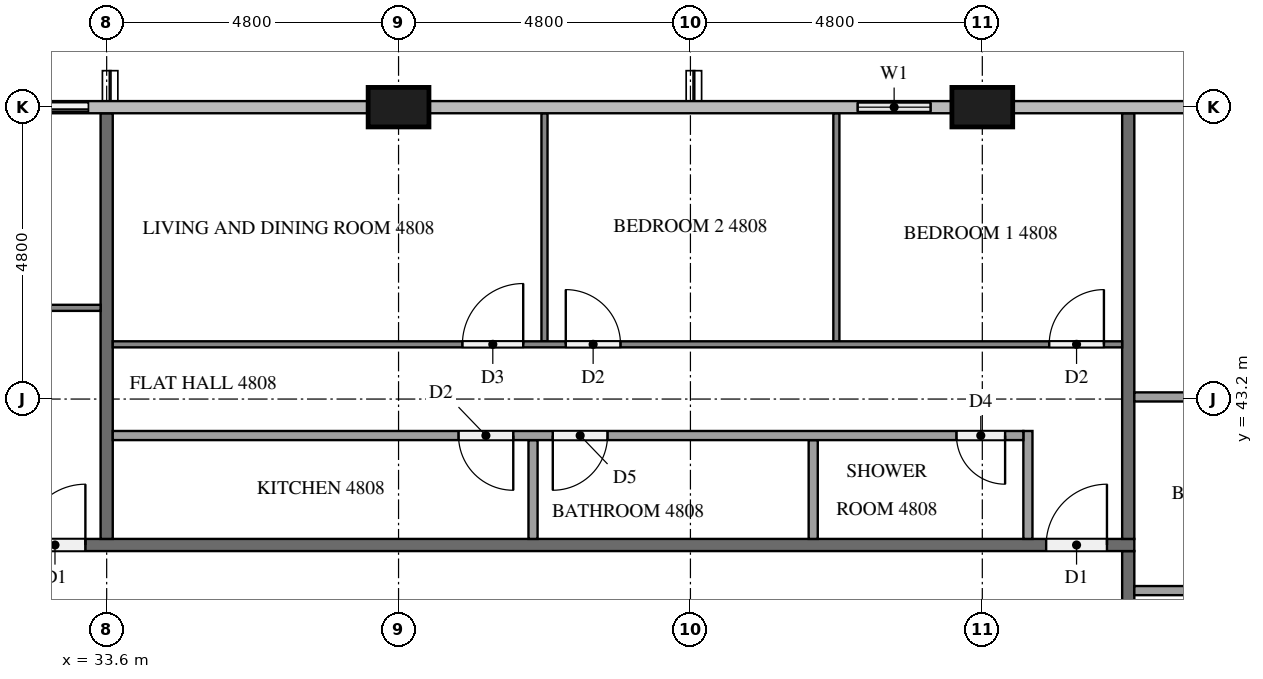
"""IFC4 building model, lengths in metres.
Left out: names, types, materials, properties, quantities, classifications, styles, units other than length and angle.
Written with IfcOpenShell. Run it as: python <this file> out.ifc"""

import sys

from ifc_helpers import new_model, si_unit, direction, frame, frame_2d, origin, origin_2d, place, context, subcontext, project, spatial, rectangle, extrude, element, fill, save


model = new_model("IFC4")
c1 = context("Model", 3, precision=1e-05, world=origin(), true_north=direction((0.0, 1.0)))
c2 = subcontext(c1, "Body", "Model", "MODEL_VIEW")
j1 = project(units=[si_unit("LENGTHUNIT", "METRE"), si_unit("PLANEANGLEUNIT", "RADIAN")], contexts=[c1])
p1 = place(None, origin())
s1 = spatial("IfcSite", under=j1, at=p1, CompositionType="ELEMENT")
p2 = place(p1, origin())
s2 = spatial("IfcBuilding", under=s1, at=p2, CompositionType="ELEMENT")
p3 = place(p2, frame((0.0, 0.0, 185.9)))
s3 = spatial("IfcBuildingStorey", under=s2, at=p3, CompositionType="ELEMENT", Elevation=185.9)
for number, where, z_axis, x_axis in (
    (1, (48.0, 48.0, 0.0), (0.0, 0.0, 1.0), (1.0, 0.0, 0.0)),
    (2, (38.4, 48.0, 0.0), (0.0, 0.0, 1.0), (1.0, 0.0, 0.0)),
):
    element("IfcColumn", number, at=place(p3, frame(where, z_axis=z_axis, x_axis=x_axis)), inside=s3, PredefinedType="COLUMN", context=c2, shape_type="SweptSolid", body=[
        extrude(rectangle(XDim=1.0, YDim=0.65, at=origin_2d()), origin(), (0.0, 0.0, 1.0), 3.2),
    ])
p4 = place(p3, frame((47.5, 48.0, 0.0), z_axis=(0.0, 0.0, 1.0), x_axis=(-1.0, 0.0, 0.0)))
e3 = element("IfcWall", 3, at=p4, inside=s3, PredefinedType="SOLIDWALL", context=c2, shape_type="SweptSolid", body=[
    extrude(rectangle(XDim=1.9, YDim=0.15, at=frame_2d((0.95, 0.0))), origin(), (0.0, 0.0, 1.0), 3.2),
])
p5 = place(p4, frame((0.35, 0.0, 0.9)))
e4 = element("IfcOpeningElement", 4, at=p5, cuts=e3, PredefinedType="OPENING", context=c2, shape_type="SweptSolid", body=[
    extrude(rectangle(XDim=1.2, YDim=1.4, at=frame_2d((0.6, 0.7))), frame((0.0, 0.085, 0.0), z_axis=(0.0, -1.0, 0.0), x_axis=(1.0, 0.0, 0.0)), (0.0, 0.0, 1.0), 0.17),
])
p6 = place(p3, frame((33.6, 48.0, 0.0), z_axis=(0.0, 0.0, 1.0), x_axis=(-1.0, 0.0, 0.0)))
e5 = element("IfcWall", 5, at=p6, inside=s3, PredefinedType="SOLIDWALL", context=c2, shape_type="SweptSolid", body=[
    extrude(rectangle(XDim=2.4, YDim=0.15, at=frame_2d((1.2, 0.0))), origin(), (0.0, 0.0, 1.0), 3.2),
])
p7 = place(p6, frame((0.3, 0.0, 0.0)))
e6 = element("IfcOpeningElement", 6, at=p7, cuts=e5, PredefinedType="OPENING", context=c2, shape_type="SweptSolid", body=[
    extrude(rectangle(XDim=1.8, YDim=2.4, at=frame_2d((0.9, 1.2))), frame((0.0, 0.085, 0.0), z_axis=(0.0, -1.0, 0.0), x_axis=(1.0, 0.0, 0.0)), (0.0, 0.0, 1.0), 0.17),
])
p8 = place(p3, frame((50.4, 40.7, 0.0), z_axis=(0.0, 0.0, 1.0), x_axis=(0.0, -1.0, 0.0)))
e7 = element("IfcWall", 7, at=p8, inside=s3, PredefinedType="PARTITIONING", context=c2, shape_type="SweptSolid", body=[
    extrude(rectangle(XDim=28.6, YDim=0.2, at=frame_2d((14.3, 0.0))), origin(), (0.0, 0.0, 1.0), 3.2),
])
p9 = place(p8, frame((27.3, 0.0, 0.0)))
e8 = element("IfcOpeningElement", 8, at=p9, cuts=e7, PredefinedType="OPENING", context=c2, shape_type="SweptSolid", body=[
    extrude(rectangle(XDim=1.1, YDim=2.1, at=frame_2d((0.55, 1.05))), frame((0.0, 0.11, 0.0), z_axis=(0.0, -1.0, 0.0), x_axis=(1.0, 0.0, 0.0)), (0.0, 0.0, 1.0), 0.22),
])
p10 = place(p8, frame((8.15, 0.0, 0.0)))
e9 = element("IfcOpeningElement", 9, at=p10, cuts=e7, PredefinedType="OPENING", context=c2, shape_type="SweptSolid", body=[
    extrude(rectangle(XDim=1.0, YDim=2.1, at=frame_2d((0.5, 1.05))), frame((0.0, 0.11, 0.0), z_axis=(0.0, -1.0, 0.0), x_axis=(1.0, 0.0, 0.0)), (0.0, 0.0, 1.0), 0.22),
])
p11 = place(p8, frame((0.95, 0.0, 0.0)))
e10 = element("IfcOpeningElement", 10, at=p11, cuts=e7, PredefinedType="OPENING", context=c2, shape_type="SweptSolid", body=[
    extrude(rectangle(XDim=1.0, YDim=2.1, at=frame_2d((0.5, 1.05))), frame((0.0, 0.11, 0.0), z_axis=(0.0, -1.0, 0.0), x_axis=(1.0, 0.0, 0.0)), (0.0, 0.0, 1.0), 0.22),
])
p12 = place(p3, frame((11.9, 40.8, 0.0), z_axis=(0.0, 0.0, 1.0), x_axis=(1.0, 0.0, 0.0)))
e11 = element("IfcWall", 11, at=p12, inside=s3, PredefinedType="PARTITIONING", context=c2, shape_type="SweptSolid", body=[
    extrude(rectangle(XDim=38.6, YDim=0.2, at=frame_2d((19.3, 0.0))), origin(), (0.0, 0.0, 1.0), 3.2),
])
p13 = place(p12, frame((37.15, 0.0, 0.0)))
e12 = element("IfcOpeningElement", 12, at=p13, cuts=e11, PredefinedType="OPENING", context=c2, shape_type="SweptSolid", body=[
    extrude(rectangle(XDim=1.0, YDim=2.1, at=frame_2d((0.5, 1.05))), frame((0.0, 0.11, 0.0), z_axis=(0.0, -1.0, 0.0), x_axis=(1.0, 0.0, 0.0)), (0.0, 0.0, 1.0), 0.22),
])
p14 = place(p12, frame((20.35, 0.0, 0.0)))
e13 = element("IfcOpeningElement", 13, at=p14, cuts=e11, PredefinedType="OPENING", context=c2, shape_type="SweptSolid", body=[
    extrude(rectangle(XDim=1.0, YDim=2.1, at=frame_2d((0.5, 1.05))), frame((0.0, 0.11, 0.0), z_axis=(0.0, -1.0, 0.0), x_axis=(1.0, 0.0, 0.0)), (0.0, 0.0, 1.0), 0.22),
])
p15 = place(p12, frame((13.15, 0.0, 0.0)))
e14 = element("IfcOpeningElement", 14, at=p15, cuts=e11, PredefinedType="OPENING", context=c2, shape_type="SweptSolid", body=[
    extrude(rectangle(XDim=1.0, YDim=2.1, at=frame_2d((0.5, 1.05))), frame((0.0, 0.11, 0.0), z_axis=(0.0, -1.0, 0.0), x_axis=(1.0, 0.0, 0.0)), (0.0, 0.0, 1.0), 0.22),
])
for number, where, z_axis, x_axis in (
    (15, (50.4, 40.9, 0.0), (0.0, 0.0, 1.0), (0.0, 1.0, 0.0)),
    (16, (33.6, 47.9, 0.0), (0.0, 0.0, 1.0), (0.0, -1.0, 0.0)),
):
    element("IfcWall", number, at=place(p3, frame(where, z_axis=z_axis, x_axis=x_axis)), inside=s3, PredefinedType="PARTITIONING", context=c2, shape_type="SweptSolid", body=[
        extrude(rectangle(XDim=7.0, YDim=0.2, at=frame_2d((3.5, 0.0))), origin(), (0.0, 0.0, 1.0), 3.2),
    ])
p16 = place(p3, frame((50.5, 43.235, 0.0), z_axis=(0.0, 0.0, 1.0), x_axis=(1.0, 0.0, 0.0)))
e17 = element("IfcWall", 17, at=p16, inside=s3, PredefinedType="PARTITIONING", context=c2, shape_type="SweptSolid", body=[
    extrude(rectangle(XDim=3.725, YDim=0.15, at=frame_2d((1.863, 0.0))), origin(), (0.0, 0.0, 1.0), 3.2),
])
p17 = place(p3, frame((50.5, 40.05, 0.0), z_axis=(0.0, 0.0, 1.0), x_axis=(1.0, 0.0, 0.0)))
e18 = element("IfcWall", 18, at=p17, inside=s3, PredefinedType="PARTITIONING", context=c2, shape_type="SweptSolid", body=[
    extrude(rectangle(XDim=3.875, YDim=0.15, at=frame_2d((1.938, 0.0))), origin(), (0.0, 0.0, 1.0), 3.2),
])
for number, where, z_axis, x_axis in (
    (19, (45.6, 44.15, 0.0), (0.0, 0.0, 1.0), (0.0, 1.0, 0.0)),
    (20, (40.8, 44.15, 0.0), (0.0, 0.0, 1.0), (0.0, 1.0, 0.0)),
):
    element("IfcWall", number, at=place(p3, frame(where, z_axis=z_axis, x_axis=x_axis)), inside=s3, PredefinedType="PARTITIONING", context=c2, shape_type="SweptSolid", body=[
        extrude(rectangle(XDim=3.75, YDim=0.1, at=frame_2d((1.875, 0.0))), origin(), (0.0, 0.0, 1.0), 3.2),
    ])
p18 = place(p3, frame((33.7, 44.1, 0.0), z_axis=(0.0, 0.0, 1.0), x_axis=(1.0, 0.0, 0.0)))
e21 = element("IfcWall", 21, at=p18, inside=s3, PredefinedType="PARTITIONING", context=c2, shape_type="SweptSolid", body=[
    extrude(rectangle(XDim=16.6, YDim=0.1, at=frame_2d((8.3, 0.0))), origin(), (0.0, 0.0, 1.0), 3.2),
])
p19 = place(p18, frame((15.4, 0.0, 0.0)))
e22 = element("IfcOpeningElement", 22, at=p19, cuts=e21, PredefinedType="OPENING", context=c2, shape_type="SweptSolid", body=[
    extrude(rectangle(XDim=0.9, YDim=2.1, at=frame_2d((0.45, 1.05))), frame((0.0, 0.06, 0.0), z_axis=(0.0, -1.0, 0.0), x_axis=(1.0, 0.0, 0.0)), (0.0, 0.0, 1.0), 0.12),
])
p20 = place(p18, frame((7.45, 0.0, 0.0)))
e23 = element("IfcOpeningElement", 23, at=p20, cuts=e21, PredefinedType="OPENING", context=c2, shape_type="SweptSolid", body=[
    extrude(rectangle(XDim=0.9, YDim=2.1, at=frame_2d((0.45, 1.05))), frame((0.0, 0.06, 0.0), z_axis=(0.0, -1.0, 0.0), x_axis=(1.0, 0.0, 0.0)), (0.0, 0.0, 1.0), 0.12),
])
p21 = place(p18, frame((5.75, 0.0, 0.0)))
e24 = element("IfcOpeningElement", 24, at=p21, cuts=e21, PredefinedType="OPENING", context=c2, shape_type="SweptSolid", body=[
    extrude(rectangle(XDim=1.0, YDim=2.1, at=frame_2d((0.5, 1.05))), frame((0.0, 0.06, 0.0), z_axis=(0.0, -1.0, 0.0), x_axis=(1.0, 0.0, 0.0)), (0.0, 0.0, 1.0), 0.12),
])
for number, where, z_axis, x_axis in (
    (25, (45.219, 40.9, 0.0), (0.0, 0.0, 1.0), (0.0, 1.0, 0.0)),
    (26, (40.612, 40.9, 0.0), (0.0, 0.0, 1.0), (0.0, 1.0, 0.0)),
):
    element("IfcWall", number, at=place(p3, frame(where, z_axis=z_axis, x_axis=x_axis)), inside=s3, PredefinedType="PARTITIONING", context=c2, shape_type="SweptSolid", body=[
        extrude(rectangle(XDim=1.625, YDim=0.15, at=frame_2d((0.812, 0.0))), origin(), (0.0, 0.0, 1.0), 3.2),
    ])
p22 = place(p3, frame((48.75, 40.9, 0.0), z_axis=(0.0, 0.0, 1.0), x_axis=(0.0, 1.0, 0.0)))
e27 = element("IfcWall", 27, at=p22, inside=s3, PredefinedType="PARTITIONING", context=c2, shape_type="SweptSolid", body=[
    extrude(rectangle(XDim=1.775, YDim=0.15, at=frame_2d((0.888, 0.0))), origin(), (0.0, 0.0, 1.0), 3.2),
])
p23 = place(p3, frame((48.675, 42.6, 0.0), z_axis=(0.0, 0.0, 1.0), x_axis=(-1.0, 0.0, 0.0)))
e28 = element("IfcWall", 28, at=p23, inside=s3, PredefinedType="PARTITIONING", context=c2, shape_type="SweptSolid", body=[
    extrude(rectangle(XDim=14.975, YDim=0.15, at=frame_2d((7.488, 0.0))), origin(), (0.0, 0.0, 1.0), 3.2),
])
p24 = place(p23, frame((0.3, 0.0, 0.0)))
e29 = element("IfcOpeningElement", 29, at=p24, cuts=e28, PredefinedType="OPENING", context=c2, shape_type="SweptSolid", body=[
    extrude(rectangle(XDim=0.8, YDim=2.1, at=frame_2d((0.4, 1.05))), frame((0.0, 0.085, 0.0), z_axis=(0.0, -1.0, 0.0), x_axis=(1.0, 0.0, 0.0)), (0.0, 0.0, 1.0), 0.17),
])
p25 = place(p23, frame((6.838, 0.0, 0.0)))
e30 = element("IfcOpeningElement", 30, at=p25, cuts=e28, PredefinedType="OPENING", context=c2, shape_type="SweptSolid", body=[
    extrude(rectangle(XDim=0.9, YDim=2.1, at=frame_2d((0.45, 1.05))), frame((0.0, 0.085, 0.0), z_axis=(0.0, -1.0, 0.0), x_axis=(1.0, 0.0, 0.0)), (0.0, 0.0, 1.0), 0.17),
])
p26 = place(p23, frame((8.388, 0.0, 0.0)))
e31 = element("IfcOpeningElement", 31, at=p26, cuts=e28, PredefinedType="OPENING", context=c2, shape_type="SweptSolid", body=[
    extrude(rectangle(XDim=0.9, YDim=2.1, at=frame_2d((0.45, 1.05))), frame((0.0, 0.085, 0.0), z_axis=(0.0, -1.0, 0.0), x_axis=(1.0, 0.0, 0.0)), (0.0, 0.0, 1.0), 0.17),
])
p27 = place(p3, frame((26.5, 44.7, 0.0), z_axis=(0.0, 0.0, 1.0), x_axis=(1.0, 0.0, 0.0)))
e32 = element("IfcWall", 32, at=p27, inside=s3, PredefinedType="PARTITIONING", context=c2, shape_type="SweptSolid", body=[
    extrude(rectangle(XDim=7.0, YDim=0.1, at=frame_2d((3.5, 0.0))), origin(), (0.0, 0.0, 1.0), 3.2),
])
p28 = place(p27, frame((0.3, 0.0, 0.0)))
e33 = element("IfcOpeningElement", 33, at=p28, cuts=e32, PredefinedType="OPENING", context=c2, shape_type="SweptSolid", body=[
    extrude(rectangle(XDim=1.0, YDim=2.1, at=frame_2d((0.5, 1.05))), frame((0.0, 0.06, 0.0), z_axis=(0.0, -1.0, 0.0), x_axis=(1.0, 0.0, 0.0)), (0.0, 0.0, 1.0), 0.12),
])
p29 = place(p5, origin())
e34 = element("IfcWindow", 34, at=p29, inside=s3, PartitioningType="SINGLE_PANEL", PredefinedType="WINDOW", context=c2, shape_type="SweptSolid", body=[
    extrude(rectangle(XDim=1.2, YDim=1.4, at=frame_2d((0.6, 0.7))), frame((0.0, 0.03, 0.0), z_axis=(0.0, -1.0, 0.0), x_axis=(1.0, 0.0, 0.0)), (0.0, 0.0, 1.0), 0.06),
])
fill(e4, e34)
p30 = place(p7, origin())
e35 = element("IfcDoor", 35, at=p30, inside=s3, OperationType="SLIDING_TO_LEFT", PredefinedType="DOOR", context=c2, shape_type="SweptSolid", body=[
    extrude(rectangle(XDim=1.8, YDim=2.4, at=frame_2d((0.9, 1.2))), frame((0.0, 0.025, 0.0), z_axis=(0.0, -1.0, 0.0), x_axis=(1.0, 0.0, 0.0)), (0.0, 0.0, 1.0), 0.05),
])
fill(e6, e35)
p31 = place(p13, origin())
e36 = element("IfcDoor", 36, at=p31, inside=s3, OperationType="SINGLE_SWING_RIGHT", PredefinedType="DOOR", context=c2, shape_type="SweptSolid", body=[
    extrude(rectangle(XDim=1.0, YDim=2.1, at=frame_2d((0.5, 1.05))), frame((0.0, 0.025, 0.0), z_axis=(0.0, -1.0, 0.0), x_axis=(1.0, 0.0, 0.0)), (0.0, 0.0, 1.0), 0.05),
])
fill(e12, e36)
p32 = place(p14, origin())
e37 = element("IfcDoor", 37, at=p32, inside=s3, OperationType="SINGLE_SWING_RIGHT", PredefinedType="DOOR", context=c2, shape_type="SweptSolid", body=[
    extrude(rectangle(XDim=1.0, YDim=2.1, at=frame_2d((0.5, 1.05))), frame((0.0, 0.025, 0.0), z_axis=(0.0, -1.0, 0.0), x_axis=(1.0, 0.0, 0.0)), (0.0, 0.0, 1.0), 0.05),
])
fill(e13, e37)
p33 = place(p19, origin())
e38 = element("IfcDoor", 38, at=p33, inside=s3, OperationType="SINGLE_SWING_RIGHT", PredefinedType="DOOR", context=c2, shape_type="SweptSolid", body=[
    extrude(rectangle(XDim=0.9, YDim=2.1, at=frame_2d((0.45, 1.05))), frame((0.0, 0.025, 0.0), z_axis=(0.0, -1.0, 0.0), x_axis=(1.0, 0.0, 0.0)), (0.0, 0.0, 1.0), 0.05),
])
fill(e22, e38)
p34 = place(p20, origin())
e39 = element("IfcDoor", 39, at=p34, inside=s3, OperationType="SINGLE_SWING_LEFT", PredefinedType="DOOR", context=c2, shape_type="SweptSolid", body=[
    extrude(rectangle(XDim=0.9, YDim=2.1, at=frame_2d((0.45, 1.05))), frame((0.0, 0.025, 0.0), z_axis=(0.0, -1.0, 0.0), x_axis=(1.0, 0.0, 0.0)), (0.0, 0.0, 1.0), 0.05),
])
fill(e23, e39)
p35 = place(p21, origin())
e40 = element("IfcDoor", 40, at=p35, inside=s3, OperationType="SINGLE_SWING_RIGHT", PredefinedType="DOOR", context=c2, shape_type="SweptSolid", body=[
    extrude(rectangle(XDim=1.0, YDim=2.1, at=frame_2d((0.5, 1.05))), frame((0.0, 0.025, 0.0), z_axis=(0.0, -1.0, 0.0), x_axis=(1.0, 0.0, 0.0)), (0.0, 0.0, 1.0), 0.05),
])
fill(e24, e40)
p36 = place(p24, origin())
e41 = element("IfcDoor", 41, at=p36, inside=s3, OperationType="SINGLE_SWING_LEFT", PredefinedType="DOOR", context=c2, shape_type="SweptSolid", body=[
    extrude(rectangle(XDim=0.8, YDim=2.1, at=frame_2d((0.4, 1.05))), frame((0.0, 0.025, 0.0), z_axis=(0.0, -1.0, 0.0), x_axis=(1.0, 0.0, 0.0)), (0.0, 0.0, 1.0), 0.05),
])
fill(e29, e41)
p37 = place(p25, origin())
e42 = element("IfcDoor", 42, at=p37, inside=s3, OperationType="SINGLE_SWING_RIGHT", PredefinedType="DOOR", context=c2, shape_type="SweptSolid", body=[
    extrude(rectangle(XDim=0.9, YDim=2.1, at=frame_2d((0.45, 1.05))), frame((0.0, 0.025, 0.0), z_axis=(0.0, -1.0, 0.0), x_axis=(1.0, 0.0, 0.0)), (0.0, 0.0, 1.0), 0.05),
])
fill(e30, e42)
p38 = place(p26, origin())
e43 = element("IfcDoor", 43, at=p38, inside=s3, OperationType="SINGLE_SWING_LEFT", PredefinedType="DOOR", context=c2, shape_type="SweptSolid", body=[
    extrude(rectangle(XDim=0.9, YDim=2.1, at=frame_2d((0.45, 1.05))), frame((0.0, 0.025, 0.0), z_axis=(0.0, -1.0, 0.0), x_axis=(1.0, 0.0, 0.0)), (0.0, 0.0, 1.0), 0.05),
])
fill(e31, e43)
save(model, sys.argv[1])
